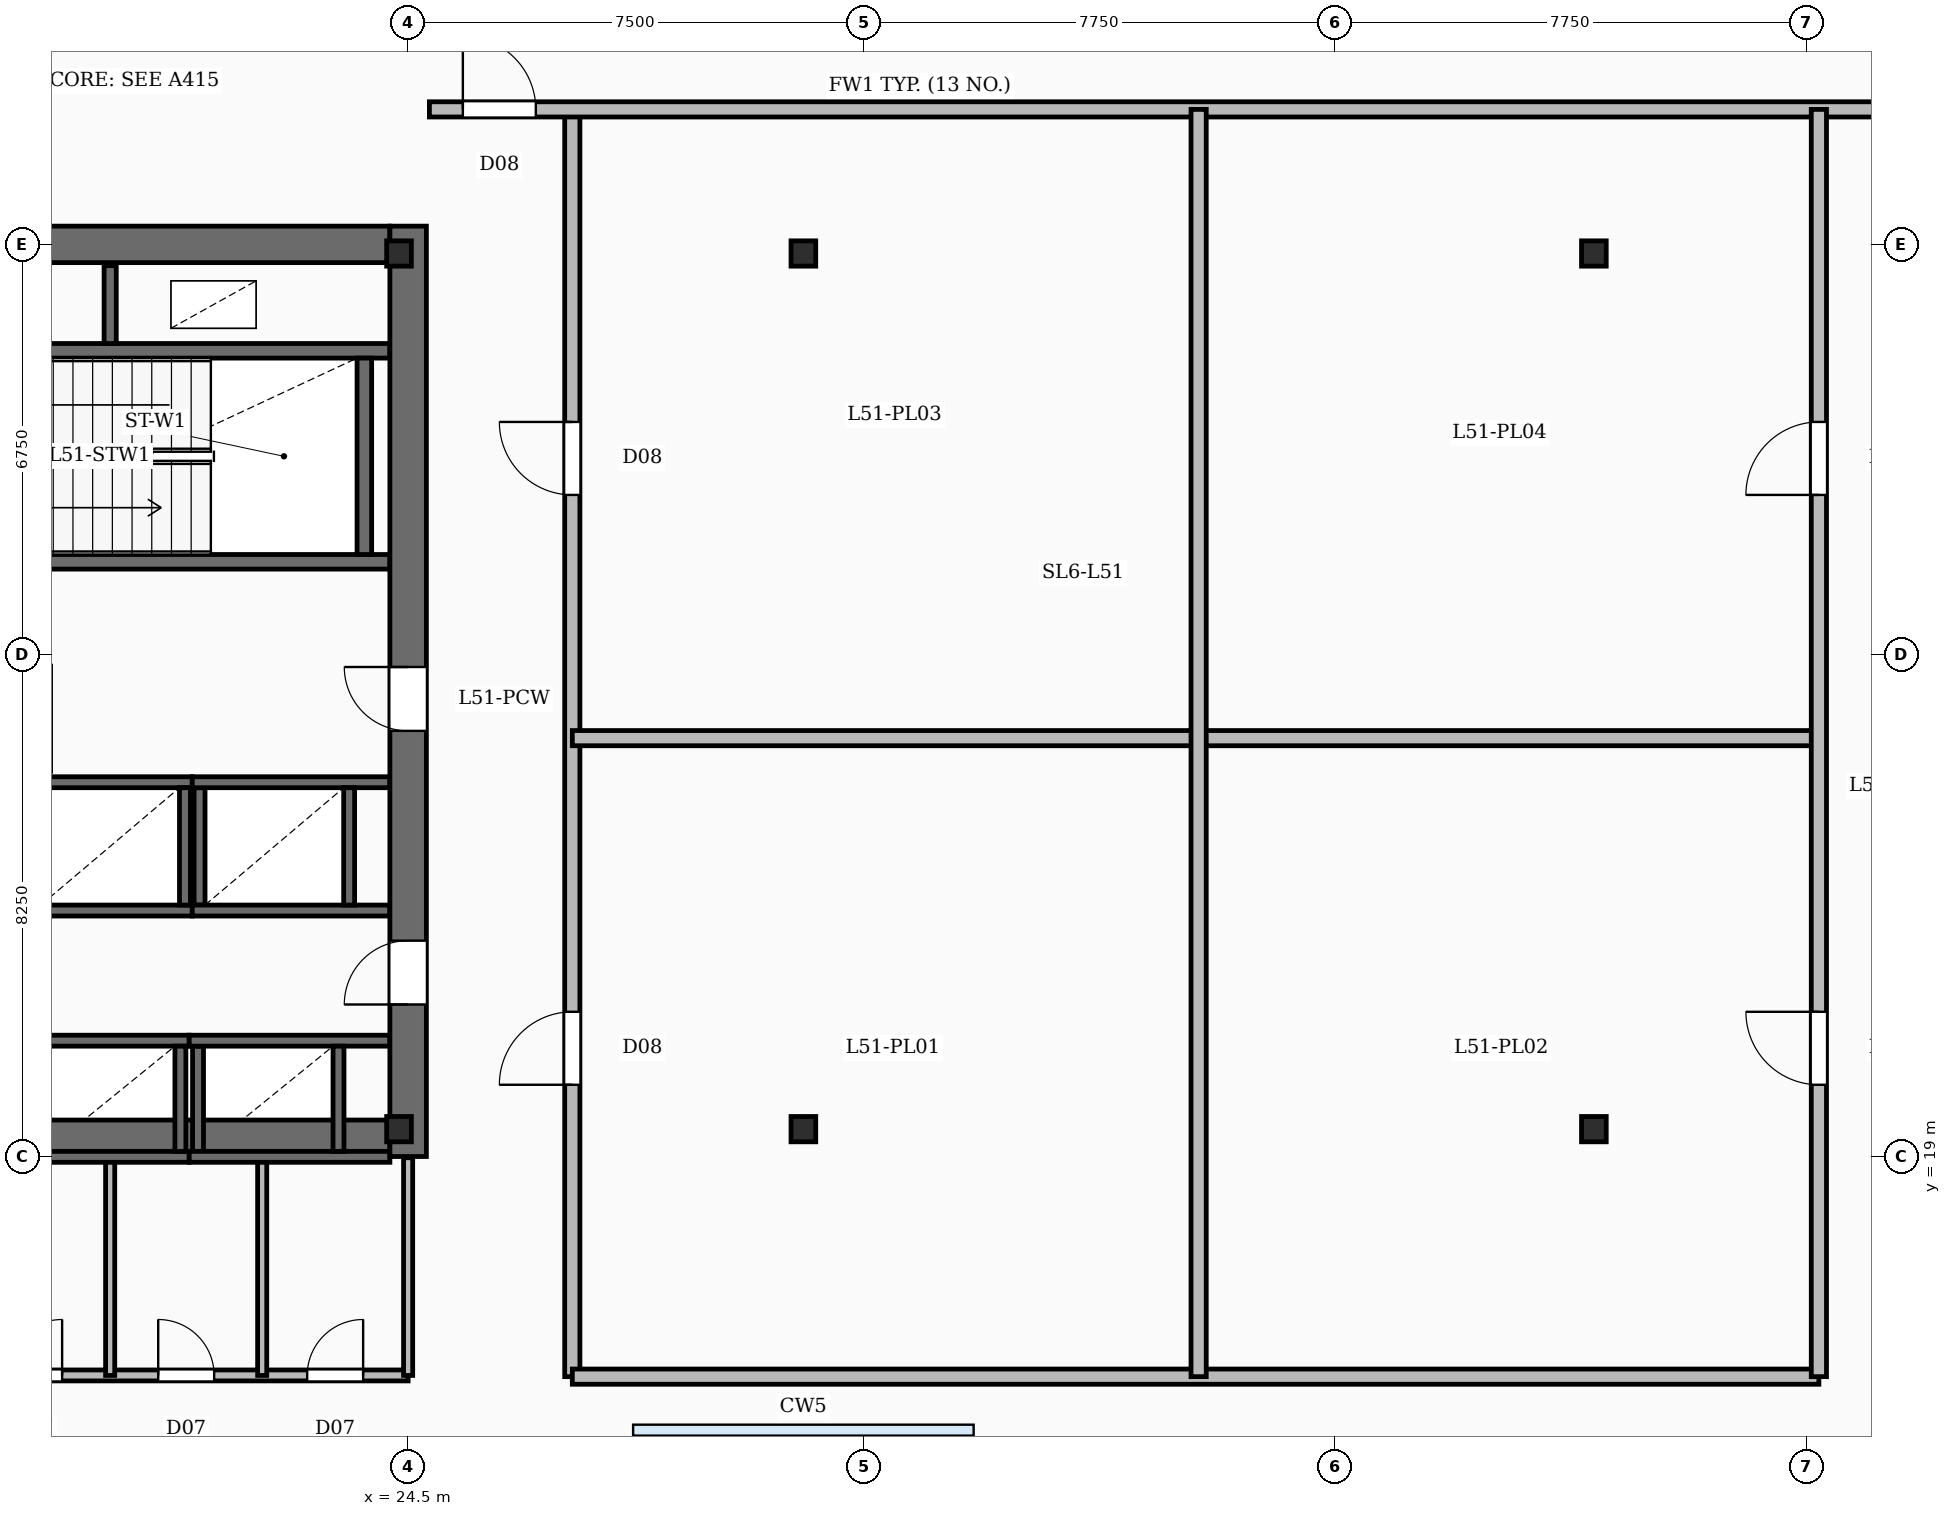
"""IFC4 building model, lengths in metres.
Left out: names, types, materials, properties, quantities, classifications, styles, units other than length and angle.
Written with IfcOpenShell. Run it as: python <this file> out.ifc"""

import sys

from ifc_helpers import new_model, si_unit, direction, frame, frame_2d, origin, origin_2d, place, context, subcontext, project, spatial, rectangle, i_section, extrude, element, fill, save


model = new_model("IFC4")
c1 = context("Model", 3, precision=1e-05, world=origin(), true_north=direction((0.0, 1.0)))
c2 = subcontext(c1, "Body", "Model", "MODEL_VIEW")
j1 = project(units=[si_unit("LENGTHUNIT", "METRE"), si_unit("PLANEANGLEUNIT", "RADIAN")], contexts=[c1])
p1 = place(None, origin())
s1 = spatial("IfcSite", under=j1, at=p1, CompositionType="ELEMENT")
p2 = place(p1, origin())
s2 = spatial("IfcBuilding", under=s1, at=p2, CompositionType="ELEMENT")
p3 = place(p2, frame((0.0, 0.0, 210.95)))
s3 = spatial("IfcBuildingStorey", under=s2, at=p3, CompositionType="ELEMENT", Elevation=210.95)
p4 = place(p3, frame((24.5, 19.0, -0.42), z_axis=(0.0, 0.0, 1.0), x_axis=(0.0, 1.0, 0.0)))
e1 = element("IfcWall", 1, at=p4, inside=s3, PredefinedType="SHEAR", context=c2, shape_type="SweptSolid", body=[
    extrude(rectangle(XDim=15.3, YDim=0.6, at=frame_2d((7.65, 0.0))), origin(), (0.0, 0.0, 1.0), 5.17),
])
p5 = place(p4, frame((2.5, 0.0, 0.42)))
e2 = element("IfcOpeningElement", 2, at=p5, cuts=e1, PredefinedType="OPENING", context=c2, shape_type="SweptSolid", body=[
    extrude(rectangle(XDim=1.05, YDim=2.15, at=frame_2d((0.525, 1.075))), frame((0.0, 0.31, 0.0), z_axis=(0.0, -1.0, 0.0), x_axis=(1.0, 0.0, 0.0)), (0.0, 0.0, 1.0), 0.62),
])
p6 = place(p4, frame((7.0, 0.0, 0.42)))
e3 = element("IfcOpeningElement", 3, at=p6, cuts=e1, PredefinedType="OPENING", context=c2, shape_type="SweptSolid", body=[
    extrude(rectangle(XDim=1.05, YDim=2.15, at=frame_2d((0.525, 1.075))), frame((0.0, 0.31, 0.0), z_axis=(0.0, -1.0, 0.0), x_axis=(1.0, 0.0, 0.0)), (0.0, 0.0, 1.0), 0.62),
])
for number, where, z_axis, x_axis in (
    (4, (14.7, 19.3, -0.42), (0.0, 0.0, 1.0), (1.0, 0.0, 0.0)),
    (5, (14.7, 34.0, -0.42), (0.0, 0.0, 1.0), (1.0, 0.0, 0.0)),
):
    element("IfcWall", number, at=place(p3, frame(where, z_axis=z_axis, x_axis=x_axis)), inside=s3, PredefinedType="SHEAR", context=c2, shape_type="SweptSolid", body=[
        extrude(rectangle(XDim=9.5, YDim=0.6, at=frame_2d((4.75, 0.0))), origin(), (0.0, 0.0, 1.0), 5.17),
    ])
for number, where, z_axis, x_axis in (
    (6, (24.35, 19.45, -0.42), (0.0, 0.0, 1.0), (1.0, 0.0, 0.0)),
    (7, (24.35, 33.85, -0.42), (0.0, 0.0, 1.0), (1.0, 0.0, 0.0)),
    (8, (31.0, 19.45, -0.42), (0.0, 0.0, 1.0), (1.0, 0.0, 0.0)),
    (9, (44.0, 19.45, -0.42), (0.0, 0.0, 1.0), (1.0, 0.0, 0.0)),
    (10, (31.0, 33.85, -0.42), (0.0, 0.0, 1.0), (1.0, 0.0, 0.0)),
    (11, (44.0, 33.85, -0.42), (0.0, 0.0, 1.0), (1.0, 0.0, 0.0)),
):
    element("IfcColumn", number, at=place(p3, frame(where, z_axis=z_axis, x_axis=x_axis)), inside=s3, PredefinedType="COLUMN", context=c2, shape_type="SweptSolid", body=[
        extrude(i_section(OverallWidth=0.406, OverallDepth=0.416, WebThickness=0.03, FlangeThickness=0.048, FilletRadius=0.02, at=origin_2d()), origin(), (0.0, 0.0, 1.0), 5.17),
    ])
p7 = place(p3, frame((24.2, 28.78, 0.0), z_axis=(0.0, 0.0, 1.0), x_axis=(-1.0, 0.0, 0.0)))
e12 = element("IfcWall", 12, at=p7, inside=s3, PredefinedType="SOLIDWALL", context=c2, shape_type="SweptSolid", body=[
    extrude(rectangle(XDim=9.5, YDim=0.24, at=frame_2d((4.75, 0.0))), origin(), (0.0, 0.0, 1.0), 4.75),
])
p8 = place(p7, frame((7.68, 0.0, 0.0)))
e13 = element("IfcOpeningElement", 13, at=p8, cuts=e12, PredefinedType="OPENING", context=c2, shape_type="SweptSolid", body=[
    extrude(rectangle(XDim=1.1, YDim=2.15, at=frame_2d((0.55, 1.075))), frame((0.0, 0.13, 0.0), z_axis=(0.0, -1.0, 0.0), x_axis=(1.0, 0.0, 0.0)), (0.0, 0.0, 1.0), 0.26),
])
p9 = place(p3, frame((14.7, 32.25, 0.0), z_axis=(0.0, 0.0, 1.0), x_axis=(1.0, 0.0, 0.0)))
e14 = element("IfcWall", 14, at=p9, inside=s3, PredefinedType="SOLIDWALL", context=c2, shape_type="SweptSolid", body=[
    extrude(rectangle(XDim=9.5, YDim=0.24, at=frame_2d((4.75, 0.0))), origin(), (0.0, 0.0, 1.0), 4.75),
])
p10 = place(p3, frame((23.78, 28.9, 0.0), z_axis=(0.0, 0.0, 1.0), x_axis=(0.0, 1.0, 0.0)))
e15 = element("IfcWall", 15, at=p10, inside=s3, PredefinedType="SOLIDWALL", context=c2, shape_type="SweptSolid", body=[
    extrude(rectangle(XDim=3.23, YDim=0.24, at=frame_2d((1.615, 0.0))), origin(), (0.0, 0.0, 1.0), 4.75),
])
p11 = place(p3, frame((19.6, 32.37, 0.0), z_axis=(0.0, 0.0, 1.0), x_axis=(0.0, 1.0, 0.0)))
e16 = element("IfcWall", 16, at=p11, inside=s3, PredefinedType="SOLIDWALL", context=c2, shape_type="SweptSolid", body=[
    extrude(rectangle(XDim=1.28, YDim=0.2, at=frame_2d((0.64, 0.0))), origin(), (0.0, 0.0, 1.0), 4.75),
])
for number, where, z_axis, x_axis in (
    (17, (18.3, 20.905, 0.0), (0.0, 0.0, 1.0), (1.0, 0.0, 0.0)),
    (18, (18.3, 18.995, 0.0), (0.0, 0.0, 1.0), (1.0, 0.0, 0.0)),
):
    element("IfcWall", number, at=place(p3, frame(where, z_axis=z_axis, x_axis=x_axis)), inside=s3, PredefinedType="SOLIDWALL", context=c2, shape_type="SweptSolid", body=[
        extrude(rectangle(XDim=2.6, YDim=0.18, at=frame_2d((1.3, 0.0))), origin(), (0.0, 0.0, 1.0), 4.75),
    ])
p12 = place(p3, frame((20.755, 19.085, 0.0), z_axis=(0.0, 0.0, 1.0), x_axis=(0.0, 1.0, 0.0)))
e19 = element("IfcWall", 19, at=p12, inside=s3, PredefinedType="SOLIDWALL", context=c2, shape_type="SweptSolid", body=[
    extrude(rectangle(XDim=1.73, YDim=0.18, at=frame_2d((0.865, 0.0))), origin(), (0.0, 0.0, 1.0), 4.75),
])
for number, where, z_axis, x_axis in (
    (20, (20.9, 20.905, 0.0), (0.0, 0.0, 1.0), (1.0, 0.0, 0.0)),
    (21, (20.9, 18.995, 0.0), (0.0, 0.0, 1.0), (1.0, 0.0, 0.0)),
):
    element("IfcWall", number, at=place(p3, frame(where, z_axis=z_axis, x_axis=x_axis)), inside=s3, PredefinedType="SOLIDWALL", context=c2, shape_type="SweptSolid", body=[
        extrude(rectangle(XDim=3.3, YDim=0.18, at=frame_2d((1.65, 0.0))), origin(), (0.0, 0.0, 1.0), 4.75),
    ])
for number, where, z_axis, x_axis in (
    (22, (21.045, 19.085, 0.0), (0.0, 0.0, 1.0), (0.0, 1.0, 0.0)),
    (23, (23.355, 19.085, 0.0), (0.0, 0.0, 1.0), (0.0, 1.0, 0.0)),
):
    element("IfcWall", number, at=place(p3, frame(where, z_axis=z_axis, x_axis=x_axis)), inside=s3, PredefinedType="SOLIDWALL", context=c2, shape_type="SweptSolid", body=[
        extrude(rectangle(XDim=1.73, YDim=0.18, at=frame_2d((0.865, 0.0))), origin(), (0.0, 0.0, 1.0), 4.75),
    ])
for number, where, z_axis, x_axis in (
    (24, (18.262, 25.155, 0.0), (0.0, 0.0, 1.0), (1.0, 0.0, 0.0)),
    (25, (18.262, 23.045, 0.0), (0.0, 0.0, 1.0), (1.0, 0.0, 0.0)),
):
    element("IfcWall", number, at=place(p3, frame(where, z_axis=z_axis, x_axis=x_axis)), inside=s3, PredefinedType="SOLIDWALL", context=c2, shape_type="SweptSolid", body=[
        extrude(rectangle(XDim=2.688, YDim=0.18, at=frame_2d((1.344, 0.0))), origin(), (0.0, 0.0, 1.0), 4.75),
    ])
p13 = place(p3, frame((20.83, 23.135, 0.0), z_axis=(0.0, 0.0, 1.0), x_axis=(0.0, 1.0, 0.0)))
e26 = element("IfcWall", 26, at=p13, inside=s3, PredefinedType="SOLIDWALL", context=c2, shape_type="SweptSolid", body=[
    extrude(rectangle(XDim=1.93, YDim=0.18, at=frame_2d((0.965, 0.0))), origin(), (0.0, 0.0, 1.0), 4.75),
])
for number, where, z_axis, x_axis in (
    (27, (20.95, 25.155, 0.0), (0.0, 0.0, 1.0), (1.0, 0.0, 0.0)),
    (28, (20.95, 23.045, 0.0), (0.0, 0.0, 1.0), (1.0, 0.0, 0.0)),
):
    element("IfcWall", number, at=place(p3, frame(where, z_axis=z_axis, x_axis=x_axis)), inside=s3, PredefinedType="SOLIDWALL", context=c2, shape_type="SweptSolid", body=[
        extrude(rectangle(XDim=3.25, YDim=0.18, at=frame_2d((1.625, 0.0))), origin(), (0.0, 0.0, 1.0), 4.75),
    ])
for number, where, z_axis, x_axis in (
    (29, (21.07, 23.135, 0.0), (0.0, 0.0, 1.0), (0.0, 1.0, 0.0)),
    (30, (23.53, 23.135, 0.0), (0.0, 0.0, 1.0), (0.0, 1.0, 0.0)),
):
    element("IfcWall", number, at=place(p3, frame(where, z_axis=z_axis, x_axis=x_axis)), inside=s3, PredefinedType="SOLIDWALL", context=c2, shape_type="SweptSolid", body=[
        extrude(rectangle(XDim=1.93, YDim=0.18, at=frame_2d((0.965, 0.0))), origin(), (0.0, 0.0, 1.0), 4.75),
    ])
for number, where, z_axis, x_axis in (
    (31, (19.6, 15.4, 0.0), (0.0, 0.0, 1.0), (0.0, 1.0, 0.0)),
    (32, (22.1, 15.4, 0.0), (0.0, 0.0, 1.0), (0.0, 1.0, 0.0)),
):
    element("IfcWall", number, at=place(p3, frame(where, z_axis=z_axis, x_axis=x_axis)), inside=s3, PredefinedType="PARTITIONING", context=c2, shape_type="SweptSolid", body=[
        extrude(rectangle(XDim=3.58, YDim=0.15, at=frame_2d((1.79, 0.0))), origin(), (0.0, 0.0, 1.0), 3.81),
    ])
p14 = place(p3, frame((14.6, 15.4, 0.0), z_axis=(0.0, 0.0, 1.0), x_axis=(1.0, 0.0, 0.0)))
e33 = element("IfcWall", 33, at=p14, inside=s3, PredefinedType="PARTITIONING", context=c2, shape_type="SweptSolid", body=[
    extrude(rectangle(XDim=9.9, YDim=0.18, at=frame_2d((4.95, 0.0))), origin(), (0.0, 0.0, 1.0), 3.81),
])
p15 = place(p14, frame((0.79, 0.0, 0.0)))
e34 = element("IfcOpeningElement", 34, at=p15, cuts=e33, PredefinedType="OPENING", context=c2, shape_type="SweptSolid", body=[
    extrude(rectangle(XDim=0.92, YDim=2.1, at=frame_2d((0.46, 1.05))), frame((0.0, 0.1, 0.0), z_axis=(0.0, -1.0, 0.0), x_axis=(1.0, 0.0, 0.0)), (0.0, 0.0, 1.0), 0.2),
])
p16 = place(p14, frame((3.29, 0.0, 0.0)))
e35 = element("IfcOpeningElement", 35, at=p16, cuts=e33, PredefinedType="OPENING", context=c2, shape_type="SweptSolid", body=[
    extrude(rectangle(XDim=0.92, YDim=2.1, at=frame_2d((0.46, 1.05))), frame((0.0, 0.1, 0.0), z_axis=(0.0, -1.0, 0.0), x_axis=(1.0, 0.0, 0.0)), (0.0, 0.0, 1.0), 0.2),
])
p17 = place(p14, frame((5.79, 0.0, 0.0)))
e36 = element("IfcOpeningElement", 36, at=p17, cuts=e33, PredefinedType="OPENING", context=c2, shape_type="SweptSolid", body=[
    extrude(rectangle(XDim=0.92, YDim=2.1, at=frame_2d((0.46, 1.05))), frame((0.0, 0.1, 0.0), z_axis=(0.0, -1.0, 0.0), x_axis=(1.0, 0.0, 0.0)), (0.0, 0.0, 1.0), 0.2),
])
p18 = place(p14, frame((8.24, 0.0, 0.0)))
e37 = element("IfcOpeningElement", 37, at=p18, cuts=e33, PredefinedType="OPENING", context=c2, shape_type="SweptSolid", body=[
    extrude(rectangle(XDim=0.92, YDim=2.1, at=frame_2d((0.46, 1.05))), frame((0.0, 0.1, 0.0), z_axis=(0.0, -1.0, 0.0), x_axis=(1.0, 0.0, 0.0)), (0.0, 0.0, 1.0), 0.2),
])
p19 = place(p3, frame((24.5, 15.4, 0.0), z_axis=(0.0, 0.0, 1.0), x_axis=(0.0, 1.0, 0.0)))
e38 = element("IfcWall", 38, at=p19, inside=s3, PredefinedType="PARTITIONING", context=c2, shape_type="SweptSolid", body=[
    extrude(rectangle(XDim=3.58, YDim=0.15, at=frame_2d((1.79, 0.0))), origin(), (0.0, 0.0, 1.0), 2.8),
])
p20 = place(p3, frame((37.5, 15.38, 0.0), z_axis=(0.0, 0.0, 1.0), x_axis=(0.0, 1.0, 0.0)))
e39 = element("IfcWall", 39, at=p20, inside=s3, PredefinedType="SOLIDWALL", context=c2, shape_type="SweptSolid", body=[
    extrude(rectangle(XDim=20.84, YDim=0.25, at=frame_2d((10.42, 0.0))), origin(), (0.0, 0.0, 1.0), 3.81),
])
for number, where, z_axis, x_axis in (
    (40, (27.2, 25.88, 0.0), (0.0, 0.0, 1.0), (1.0, 0.0, 0.0)),
    (41, (27.2, 15.38, 0.0), (0.0, 0.0, 1.0), (1.0, 0.0, 0.0)),
):
    element("IfcWall", number, at=place(p3, frame(where, z_axis=z_axis, x_axis=x_axis)), inside=s3, PredefinedType="SOLIDWALL", context=c2, shape_type="SweptSolid", body=[
        extrude(rectangle(XDim=20.5, YDim=0.25, at=frame_2d((10.25, 0.0))), origin(), (0.0, 0.0, 1.0), 3.81),
    ])
p21 = place(p3, frame((24.85, 36.22, 0.0), z_axis=(0.0, 0.0, 1.0), x_axis=(1.0, 0.0, 0.0)))
e42 = element("IfcWall", 42, at=p21, inside=s3, PredefinedType="SOLIDWALL", context=c2, shape_type="SweptSolid", body=[
    extrude(rectangle(XDim=25.2, YDim=0.25, at=frame_2d((12.6, 0.0))), origin(), (0.0, 0.0, 1.0), 3.81),
])
p22 = place(p21, frame((0.55, 0.0, 0.0)))
e43 = element("IfcOpeningElement", 43, at=p22, cuts=e42, PredefinedType="OPENING", context=c2, shape_type="SweptSolid", body=[
    extrude(rectangle(XDim=1.2, YDim=2.2, at=frame_2d((0.6, 1.1))), frame((0.0, 0.135, 0.0), z_axis=(0.0, -1.0, 0.0), x_axis=(1.0, 0.0, 0.0)), (0.0, 0.0, 1.0), 0.27),
])
p23 = place(p3, frame((27.2, 15.38, 0.0), z_axis=(0.0, 0.0, 1.0), x_axis=(0.0, 1.0, 0.0)))
e44 = element("IfcWall", 44, at=p23, inside=s3, PredefinedType="SOLIDWALL", context=c2, shape_type="SweptSolid", body=[
    extrude(rectangle(XDim=20.84, YDim=0.25, at=frame_2d((10.42, 0.0))), origin(), (0.0, 0.0, 1.0), 3.81),
])
p24 = place(p23, frame((4.8, 0.0, 0.0)))
e45 = element("IfcOpeningElement", 45, at=p24, cuts=e44, PredefinedType="OPENING", context=c2, shape_type="SweptSolid", body=[
    extrude(rectangle(XDim=1.2, YDim=2.2, at=frame_2d((0.6, 1.1))), frame((0.0, 0.135, 0.0), z_axis=(0.0, -1.0, 0.0), x_axis=(1.0, 0.0, 0.0)), (0.0, 0.0, 1.0), 0.27),
])
p25 = place(p23, frame((14.5, 0.0, 0.0)))
e46 = element("IfcOpeningElement", 46, at=p25, cuts=e44, PredefinedType="OPENING", context=c2, shape_type="SweptSolid", body=[
    extrude(rectangle(XDim=1.2, YDim=2.2, at=frame_2d((0.6, 1.1))), frame((0.0, 0.135, 0.0), z_axis=(0.0, -1.0, 0.0), x_axis=(1.0, 0.0, 0.0)), (0.0, 0.0, 1.0), 0.27),
])
p26 = place(p3, frame((47.7, 15.38, 0.0), z_axis=(0.0, 0.0, 1.0), x_axis=(0.0, 1.0, 0.0)))
e47 = element("IfcWall", 47, at=p26, inside=s3, PredefinedType="SOLIDWALL", context=c2, shape_type="SweptSolid", body=[
    extrude(rectangle(XDim=20.84, YDim=0.25, at=frame_2d((10.42, 0.0))), origin(), (0.0, 0.0, 1.0), 3.81),
])
p27 = place(p26, frame((4.8, 0.0, 0.0)))
e48 = element("IfcOpeningElement", 48, at=p27, cuts=e47, PredefinedType="OPENING", context=c2, shape_type="SweptSolid", body=[
    extrude(rectangle(XDim=1.2, YDim=2.2, at=frame_2d((0.6, 1.1))), frame((0.0, 0.135, 0.0), z_axis=(0.0, -1.0, 0.0), x_axis=(1.0, 0.0, 0.0)), (0.0, 0.0, 1.0), 0.27),
])
p28 = place(p26, frame((14.5, 0.0, 0.0)))
e49 = element("IfcOpeningElement", 49, at=p28, cuts=e47, PredefinedType="OPENING", context=c2, shape_type="SweptSolid", body=[
    extrude(rectangle(XDim=1.2, YDim=2.2, at=frame_2d((0.6, 1.1))), frame((0.0, 0.135, 0.0), z_axis=(0.0, -1.0, 0.0), x_axis=(1.0, 0.0, 0.0)), (0.0, 0.0, 1.0), 0.27),
])
p29 = place(p5, origin())
e50 = element("IfcDoor", 50, at=p29, inside=s3, OperationType="SINGLE_SWING_LEFT", PredefinedType="DOOR", context=c2, shape_type="SweptSolid", body=[
    extrude(rectangle(XDim=1.05, YDim=2.15, at=frame_2d((0.525, 1.075))), frame((0.0, 0.025, 0.0), z_axis=(0.0, -1.0, 0.0), x_axis=(1.0, 0.0, 0.0)), (0.0, 0.0, 1.0), 0.05),
])
fill(e2, e50)
p30 = place(p6, origin())
e51 = element("IfcDoor", 51, at=p30, inside=s3, OperationType="SINGLE_SWING_RIGHT", PredefinedType="DOOR", context=c2, shape_type="SweptSolid", body=[
    extrude(rectangle(XDim=1.05, YDim=2.15, at=frame_2d((0.525, 1.075))), frame((0.0, 0.025, 0.0), z_axis=(0.0, -1.0, 0.0), x_axis=(1.0, 0.0, 0.0)), (0.0, 0.0, 1.0), 0.05),
])
fill(e3, e51)
p31 = place(p16, origin())
e52 = element("IfcDoor", 52, at=p31, inside=s3, OperationType="SINGLE_SWING_RIGHT", PredefinedType="DOOR", context=c2, shape_type="SweptSolid", body=[
    extrude(rectangle(XDim=0.92, YDim=2.1, at=frame_2d((0.46, 1.05))), frame((0.0, 0.025, 0.0), z_axis=(0.0, -1.0, 0.0), x_axis=(1.0, 0.0, 0.0)), (0.0, 0.0, 1.0), 0.05),
])
fill(e35, e52)
p32 = place(p17, origin())
e53 = element("IfcDoor", 53, at=p32, inside=s3, OperationType="SINGLE_SWING_LEFT", PredefinedType="DOOR", context=c2, shape_type="SweptSolid", body=[
    extrude(rectangle(XDim=0.92, YDim=2.1, at=frame_2d((0.46, 1.05))), frame((0.0, 0.025, 0.0), z_axis=(0.0, -1.0, 0.0), x_axis=(1.0, 0.0, 0.0)), (0.0, 0.0, 1.0), 0.05),
])
fill(e36, e53)
p33 = place(p18, origin())
e54 = element("IfcDoor", 54, at=p33, inside=s3, OperationType="SINGLE_SWING_RIGHT", PredefinedType="DOOR", context=c2, shape_type="SweptSolid", body=[
    extrude(rectangle(XDim=0.92, YDim=2.1, at=frame_2d((0.46, 1.05))), frame((0.0, 0.025, 0.0), z_axis=(0.0, -1.0, 0.0), x_axis=(1.0, 0.0, 0.0)), (0.0, 0.0, 1.0), 0.05),
])
fill(e37, e54)
p34 = place(p22, origin())
e55 = element("IfcDoor", 55, at=p34, inside=s3, OperationType="SINGLE_SWING_LEFT", PredefinedType="DOOR", context=c2, shape_type="SweptSolid", body=[
    extrude(rectangle(XDim=1.2, YDim=2.2, at=frame_2d((0.6, 1.1))), frame((0.0, 0.025, 0.0), z_axis=(0.0, -1.0, 0.0), x_axis=(1.0, 0.0, 0.0)), (0.0, 0.0, 1.0), 0.05),
])
fill(e43, e55)
p35 = place(p24, origin())
e56 = element("IfcDoor", 56, at=p35, inside=s3, OperationType="SINGLE_SWING_LEFT", PredefinedType="DOOR", context=c2, shape_type="SweptSolid", body=[
    extrude(rectangle(XDim=1.2, YDim=2.2, at=frame_2d((0.6, 1.1))), frame((0.0, 0.025, 0.0), z_axis=(0.0, -1.0, 0.0), x_axis=(1.0, 0.0, 0.0)), (0.0, 0.0, 1.0), 0.05),
])
fill(e45, e56)
p36 = place(p25, origin())
e57 = element("IfcDoor", 57, at=p36, inside=s3, OperationType="SINGLE_SWING_RIGHT", PredefinedType="DOOR", context=c2, shape_type="SweptSolid", body=[
    extrude(rectangle(XDim=1.2, YDim=2.2, at=frame_2d((0.6, 1.1))), frame((0.0, 0.025, 0.0), z_axis=(0.0, -1.0, 0.0), x_axis=(1.0, 0.0, 0.0)), (0.0, 0.0, 1.0), 0.05),
])
fill(e46, e57)
p37 = place(p27, origin())
e58 = element("IfcDoor", 58, at=p37, inside=s3, OperationType="SINGLE_SWING_RIGHT", PredefinedType="DOOR", context=c2, shape_type="SweptSolid", body=[
    extrude(rectangle(XDim=1.2, YDim=2.2, at=frame_2d((0.6, 1.1))), frame((0.0, 0.025, 0.0), z_axis=(0.0, -1.0, 0.0), x_axis=(1.0, 0.0, 0.0)), (0.0, 0.0, 1.0), 0.05),
])
fill(e48, e58)
p38 = place(p28, origin())
e59 = element("IfcDoor", 59, at=p38, inside=s3, OperationType="SINGLE_SWING_LEFT", PredefinedType="DOOR", context=c2, shape_type="SweptSolid", body=[
    extrude(rectangle(XDim=1.2, YDim=2.2, at=frame_2d((0.6, 1.1))), frame((0.0, 0.025, 0.0), z_axis=(0.0, -1.0, 0.0), x_axis=(1.0, 0.0, 0.0)), (0.0, 0.0, 1.0), 0.05),
])
fill(e49, e59)
save(model, sys.argv[1])
